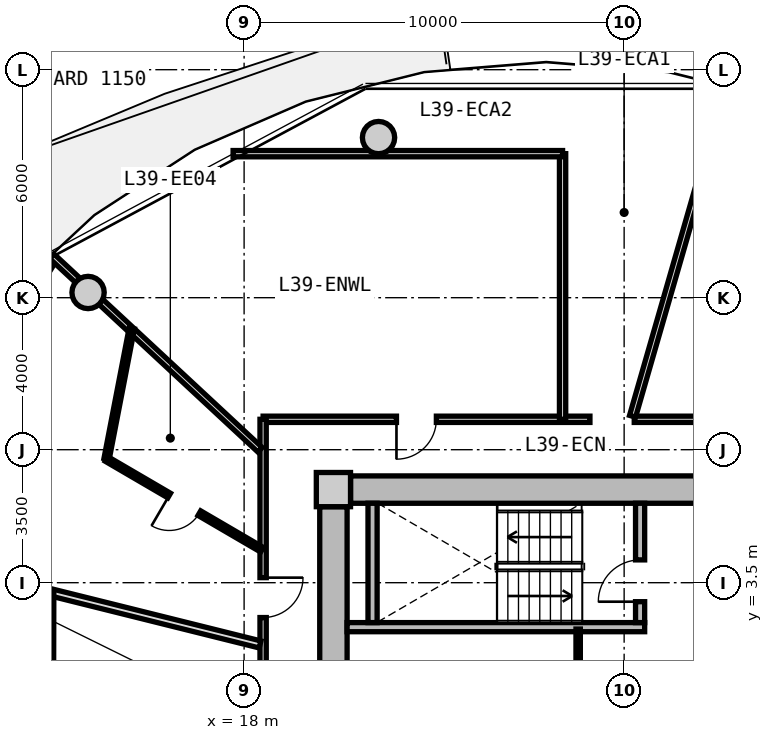
"""IFC4 building model, lengths in metres.
Left out: names, types, materials, properties, quantities, classifications, styles, units other than length and angle.
Written with IfcOpenShell. Run it as: python <this file> out.ifc"""

import sys

from ifc_helpers import new_model, si_unit, direction, frame, frame_2d, origin, origin_2d, place, context, subcontext, project, spatial, rectangle, circle, extrude, source, transform, mapped, element, fill, save


model = new_model("IFC4")
c1 = context("Model", 3, precision=1e-05, world=origin(), true_north=direction((0.0, 1.0)))
c2 = subcontext(c1, "Body", "Model", "MODEL_VIEW")
j1 = project(units=[si_unit("LENGTHUNIT", "METRE"), si_unit("PLANEANGLEUNIT", "RADIAN")], contexts=[c1])
p1 = place(None, origin())
s1 = spatial("IfcSite", under=j1, at=p1, CompositionType="ELEMENT")
p2 = place(p1, origin())
s2 = spatial("IfcBuilding", under=s1, at=p2, CompositionType="ELEMENT")
p3 = place(p2, frame((0.0, 0.0, 126.75)))
s3 = spatial("IfcBuildingStorey", under=s2, at=p3, CompositionType="ELEMENT", Elevation=126.75)
m1 = source(origin(), c2, "Body", "SweptSolid", [
    extrude(rectangle(XDim=0.9, YDim=0.9, at=origin_2d()), origin(), (0.0, 0.0, 1.0), 3.05),
])
p4 = place(p3, frame((20.35, 5.95, 0.0), z_axis=(0.0, 0.0, 1.0), x_axis=(1.0, 0.0, 0.0)))
e1 = element("IfcColumn", 1, at=p4, inside=s3, PredefinedType="COLUMN", context=c2, shape_type="MappedRepresentation", body=[
    mapped(m1, transform((0.0, 0.0, 0.0), x_axis=(1.0, 0.0, 0.0), y_axis=(0.0, 1.0, 0.0), z_axis=(0.0, 0.0, 1.0), scale=1.0)),
])
m2 = source(origin(), c2, "Body", "SweptSolid", [
    extrude(rectangle(XDim=14.4, YDim=0.72, at=frame_2d((7.2, 0.0))), origin(), (0.0, 0.0, 1.0), 2.73),
])
p5 = place(p3, frame((20.8, 5.95, 0.0), z_axis=(0.0, 0.0, 1.0), x_axis=(1.0, 0.0, 0.0)))
e2 = element("IfcWall", 2, at=p5, inside=s3, PredefinedType="SHEAR", context=c2, shape_type="MappedRepresentation", body=[
    mapped(m2, transform((0.0, 0.0, 0.0), x_axis=(1.0, 0.0, 0.0), y_axis=(0.0, 1.0, 0.0), z_axis=(0.0, 0.0, 1.0), scale=1.0)),
])
m3 = source(origin(), c2, "Body", "SweptSolid", [
    extrude(rectangle(XDim=11.0, YDim=0.72, at=frame_2d((5.5, 0.0))), origin(), (0.0, 0.0, 1.0), 2.73),
])
p6 = place(p3, frame((20.35, -5.5, 0.0), z_axis=(0.0, 0.0, 1.0), x_axis=(0.0, 1.0, 0.0)))
e3 = element("IfcWall", 3, at=p6, inside=s3, PredefinedType="SHEAR", context=c2, shape_type="MappedRepresentation", body=[
    mapped(m3, transform((0.0, 0.0, 0.0), x_axis=(1.0, 0.0, 0.0), y_axis=(0.0, 1.0, 0.0), z_axis=(0.0, 0.0, 1.0), scale=1.0)),
])
p7 = place(p6, frame((3.8, 0.0, 0.0)))
e4 = element("IfcOpeningElement", 4, at=p7, cuts=e3, PredefinedType="OPENING", context=c2, shape_type="SweptSolid", body=[
    extrude(rectangle(XDim=1.2, YDim=2.15, at=frame_2d((0.6, 1.075))), frame((0.0, 0.37, 0.0), z_axis=(0.0, -1.0, 0.0), x_axis=(1.0, 0.0, 0.0)), (0.0, 0.0, 1.0), 0.74),
])
m4 = source(origin(), c2, "Body", "SweptSolid", [
    extrude(circle(Radius=0.425, at=origin_2d()), origin(), (0.0, 0.0, 1.0), 3.05),
])
for number, where, z_axis, x_axis in (
    (5, (21.537, 15.213, 0.0), (0.0, 0.0, 1.0), (1.0, 0.0, 0.0)),
    (6, (13.894, 11.137, 0.0), (0.0, 0.0, 1.0), (1.0, 0.0, 0.0)),
):
    element("IfcColumn", number, at=place(p3, frame(where, z_axis=z_axis, x_axis=x_axis)), inside=s3, PredefinedType="COLUMN", context=c2, shape_type="MappedRepresentation", body=[
        mapped(m4, transform((0.0, 0.0, 0.0), x_axis=(1.0, 0.0, 0.0), y_axis=(0.0, 1.0, 0.0), z_axis=(0.0, 0.0, 1.0), scale=1.0)),
    ])
m5 = source(origin(), c2, "Body", "SweptSolid", [
    extrude(rectangle(XDim=9.014, YDim=0.29, at=frame_2d((4.507, 0.0))), origin(), (0.0, 0.0, 1.0), 2.73),
])
p8 = place(p3, frame((8.196, 4.421, 0.0), z_axis=(0.0, 0.0, 1.0), x_axis=(0.527732945084, 0.849410347637, 0.0)))
e7 = element("IfcWall", 7, at=p8, inside=s3, PredefinedType="SOLIDWALL", context=c2, shape_type="MappedRepresentation", body=[
    mapped(m5, transform((0.0, 0.0, 0.0), x_axis=(1.0, 0.0, 0.0), y_axis=(0.0, 1.0, 0.0), z_axis=(0.0, 0.0, 1.0), scale=1.0)),
])
p9 = place(p8, frame((6.98, 0.0, 0.0)))
e8 = element("IfcOpeningElement", 8, at=p9, cuts=e7, PredefinedType="OPENING", context=c2, shape_type="SweptSolid", body=[
    extrude(rectangle(XDim=1.15, YDim=2.25, at=frame_2d((0.575, 1.125))), frame((0.0, 0.155, 0.0), z_axis=(0.0, -1.0, 0.0), x_axis=(1.0, 0.0, 0.0)), (0.0, 0.0, 1.0), 0.31),
])
p10 = place(p8, frame((0.85, 0.0, 0.85)))
e9 = element("IfcOpeningElement", 9, at=p10, cuts=e7, PredefinedType="OPENING", context=c2, shape_type="SweptSolid", body=[
    extrude(rectangle(XDim=1.2, YDim=1.5, at=frame_2d((0.6, 0.75))), frame((0.0, 0.155, 0.0), z_axis=(0.0, -1.0, 0.0), x_axis=(1.0, 0.0, 0.0)), (0.0, 0.0, 1.0), 0.31),
])
m6 = source(origin(), c2, "Body", "SweptSolid", [
    extrude(rectangle(XDim=7.83, YDim=0.24, at=frame_2d((3.915, 0.0))), origin(), (0.0, 0.0, 1.0), 2.73),
])
p11 = place(p3, frame((20.71, 2.33, 0.0), z_axis=(0.0, 0.0, 1.0), x_axis=(1.0, 0.0, 0.0)))
e10 = element("IfcWall", 10, at=p11, inside=s3, PredefinedType="PARTITIONING", context=c2, shape_type="MappedRepresentation", body=[
    mapped(m6, transform((0.0, 0.0, 0.0), x_axis=(1.0, 0.0, 0.0), y_axis=(0.0, 1.0, 0.0), z_axis=(0.0, 0.0, 1.0), scale=1.0)),
])
m7 = source(origin(), c2, "Body", "SweptSolid", [
    extrude(rectangle(XDim=3.14, YDim=0.24, at=frame_2d((1.57, 0.0))), origin(), (0.0, 0.0, 1.0), 2.73),
])
p12 = place(p3, frame((21.38, 2.45, 0.0), z_axis=(0.0, 0.0, 1.0), x_axis=(0.0, 1.0, 0.0)))
e11 = element("IfcWall", 11, at=p12, inside=s3, PredefinedType="PARTITIONING", context=c2, shape_type="MappedRepresentation", body=[
    mapped(m7, transform((0.0, 0.0, 0.0), x_axis=(1.0, 0.0, 0.0), y_axis=(0.0, 1.0, 0.0), z_axis=(0.0, 0.0, 1.0), scale=1.0)),
])
p13 = place(p3, frame((28.42, 2.45, 0.0), z_axis=(0.0, 0.0, 1.0), x_axis=(0.0, 1.0, 0.0)))
e12 = element("IfcWall", 12, at=p13, inside=s3, PredefinedType="PARTITIONING", context=c2, shape_type="MappedRepresentation", body=[
    mapped(m7, transform((0.0, 0.0, 0.0), x_axis=(1.0, 0.0, 0.0), y_axis=(0.0, 1.0, 0.0), z_axis=(0.0, 0.0, 1.0), scale=1.0)),
])
p14 = place(p13, frame((0.55, 0.0, 0.0)))
e13 = element("IfcOpeningElement", 13, at=p14, cuts=e12, PredefinedType="OPENING", context=c2, shape_type="SweptSolid", body=[
    extrude(rectangle(XDim=1.1, YDim=2.15, at=frame_2d((0.55, 1.075))), frame((0.0, 0.13, 0.0), z_axis=(0.0, -1.0, 0.0), x_axis=(1.0, 0.0, 0.0)), (0.0, 0.0, 1.0), 0.26),
])
m8 = source(origin(), c2, "Body", "SweptSolid", [
    extrude(rectangle(XDim=2.33, YDim=0.115, at=frame_2d((1.165, 0.0))), origin(), (0.0, 0.0, 1.0), 2.715),
])
p15 = place(p3, frame((26.79, -0.05, 0.0), z_axis=(0.0, 0.0, 1.0), x_axis=(0.0, 1.0, 0.0)))
e14 = element("IfcWall", 14, at=p15, inside=s3, PredefinedType="PARTITIONING", context=c2, shape_type="MappedRepresentation", body=[
    mapped(m8, transform((0.0, 0.0, 0.0), x_axis=(1.0, 0.0, 0.0), y_axis=(0.0, 1.0, 0.0), z_axis=(0.0, 0.0, 1.0), scale=1.0)),
])
m9 = source(origin(), c2, "Body", "SweptSolid", [
    extrude(rectangle(XDim=8.6, YDim=0.165, at=frame_2d((4.3, 0.0))), origin(), (0.0, 0.0, 1.0), 2.715),
])
p16 = place(p3, frame((18.5, 7.8, 0.0), z_axis=(0.0, 0.0, 1.0), x_axis=(1.0, 0.0, 0.0)))
e15 = element("IfcWall", 15, at=p16, inside=s3, PredefinedType="PARTITIONING", context=c2, shape_type="MappedRepresentation", body=[
    mapped(m9, transform((0.0, 0.0, 0.0), x_axis=(1.0, 0.0, 0.0), y_axis=(0.0, 1.0, 0.0), z_axis=(0.0, 0.0, 1.0), scale=1.0)),
])
p17 = place(p16, frame((3.509, 0.0, 0.0)))
e16 = element("IfcOpeningElement", 16, at=p17, cuts=e15, PredefinedType="OPENING", context=c2, shape_type="SweptSolid", body=[
    extrude(rectangle(XDim=1.05, YDim=2.15, at=frame_2d((0.525, 1.075))), frame((0.0, 0.093, 0.0), z_axis=(0.0, -1.0, 0.0), x_axis=(1.0, 0.0, 0.0)), (0.0, 0.0, 1.0), 0.185),
])
m10 = source(origin(), c2, "Body", "SweptSolid", [
    extrude(rectangle(XDim=9.234, YDim=0.165, at=frame_2d((4.617, 0.0))), origin(), (0.0, 0.0, 1.0), 2.715),
])
p18 = place(p3, frame((28.266, 7.8, 0.0), z_axis=(0.0, 0.0, 1.0), x_axis=(1.0, 0.0, 0.0)))
e17 = element("IfcWall", 17, at=p18, inside=s3, PredefinedType="PARTITIONING", context=c2, shape_type="MappedRepresentation", body=[
    mapped(m10, transform((0.0, 0.0, 0.0), x_axis=(1.0, 0.0, 0.0), y_axis=(0.0, 1.0, 0.0), z_axis=(0.0, 0.0, 1.0), scale=1.0)),
])
p19 = place(p18, frame((7.074, 0.0, 0.0)))
e18 = element("IfcOpeningElement", 18, at=p19, cuts=e17, PredefinedType="OPENING", context=c2, shape_type="SweptSolid", body=[
    extrude(rectangle(XDim=0.92, YDim=2.1, at=frame_2d((0.46, 1.05))), frame((0.0, 0.093, 0.0), z_axis=(0.0, -1.0, 0.0), x_axis=(1.0, 0.0, 0.0)), (0.0, 0.0, 1.0), 0.185),
])
p20 = place(p18, frame((2.588, 0.0, 0.0)))
e19 = element("IfcOpeningElement", 19, at=p20, cuts=e17, PredefinedType="OPENING", context=c2, shape_type="SweptSolid", body=[
    extrude(rectangle(XDim=1.25, YDim=2.2, at=frame_2d((0.625, 1.1))), frame((0.0, 0.093, 0.0), z_axis=(0.0, -1.0, 0.0), x_axis=(1.0, 0.0, 0.0)), (0.0, 0.0, 1.0), 0.185),
])
m11 = source(origin(), c2, "Body", "SweptSolid", [
    extrude(rectangle(XDim=15.6, YDim=0.165, at=frame_2d((7.8, 0.0))), origin(), (0.0, 0.0, 1.0), 2.715),
])
p21 = place(p3, frame((18.5, -7.8, 0.0), z_axis=(0.0, 0.0, 1.0), x_axis=(0.0, 1.0, 0.0)))
e20 = element("IfcWall", 20, at=p21, inside=s3, PredefinedType="PARTITIONING", context=c2, shape_type="MappedRepresentation", body=[
    mapped(m11, transform((0.0, 0.0, 0.0), x_axis=(1.0, 0.0, 0.0), y_axis=(0.0, 1.0, 0.0), z_axis=(0.0, 0.0, 1.0), scale=1.0)),
])
p22 = place(p21, frame((10.383, 0.0, 0.0)))
e21 = element("IfcOpeningElement", 21, at=p22, cuts=e20, PredefinedType="OPENING", context=c2, shape_type="SweptSolid", body=[
    extrude(rectangle(XDim=1.05, YDim=2.15, at=frame_2d((0.525, 1.075))), frame((0.0, 0.093, 0.0), z_axis=(0.0, -1.0, 0.0), x_axis=(1.0, 0.0, 0.0)), (0.0, 0.0, 1.0), 0.185),
])
p23 = place(p21, frame((6.419, 0.0, 0.0)))
e22 = element("IfcOpeningElement", 22, at=p23, cuts=e20, PredefinedType="OPENING", context=c2, shape_type="SweptSolid", body=[
    extrude(rectangle(XDim=1.05, YDim=2.15, at=frame_2d((0.525, 1.075))), frame((0.0, 0.093, 0.0), z_axis=(0.0, -1.0, 0.0), x_axis=(1.0, 0.0, 0.0)), (0.0, 0.0, 1.0), 0.185),
])
m12 = source(origin(), c2, "Body", "SweptSolid", [
    extrude(rectangle(XDim=8.989, YDim=0.165, at=frame_2d((4.495, 0.0))), origin(), (0.0, 0.0, 1.0), 2.215),
])
p24 = place(p3, frame((28.222, 7.88, 0.0), z_axis=(0.0, 0.0, 1.0), x_axis=(0.27702323008, 0.960863221274, 0.0)))
e23 = element("IfcWall", 23, at=p24, inside=s3, PredefinedType="PARTITIONING", context=c2, shape_type="MappedRepresentation", body=[
    mapped(m12, transform((0.0, 0.0, 0.0), x_axis=(1.0, 0.0, 0.0), y_axis=(0.0, 1.0, 0.0), z_axis=(0.0, 0.0, 1.0), scale=1.0)),
])
m13 = source(origin(), c2, "Body", "SweptSolid", [
    extrude(rectangle(XDim=7.482, YDim=0.165, at=frame_2d((3.741, 0.0))), origin(), (0.0, 0.0, 1.0), 2.215),
])
p25 = place(p3, frame((18.42, 6.998, 0.0), z_axis=(0.0, 0.0, 1.0), x_axis=(-0.732508698043, 0.680757671489, 0.0)))
e24 = element("IfcWall", 24, at=p25, inside=s3, PredefinedType="PARTITIONING", context=c2, shape_type="MappedRepresentation", body=[
    mapped(m13, transform((0.0, 0.0, 0.0), x_axis=(1.0, 0.0, 0.0), y_axis=(0.0, 1.0, 0.0), z_axis=(0.0, 0.0, 1.0), scale=1.0)),
])
m14 = source(origin(), c2, "Body", "SweptSolid", [
    extrude(rectangle(XDim=6.99, YDim=0.165, at=frame_2d((3.495, 0.0))), origin(), (0.0, 0.0, 1.0), 2.715),
])
p26 = place(p3, frame((26.38, 7.8, 0.0), z_axis=(0.0, 0.0, 1.0), x_axis=(0.0, 1.0, 0.0)))
e25 = element("IfcWall", 25, at=p26, inside=s3, PredefinedType="PARTITIONING", context=c2, shape_type="MappedRepresentation", body=[
    mapped(m14, transform((0.0, 0.0, 0.0), x_axis=(1.0, 0.0, 0.0), y_axis=(0.0, 1.0, 0.0), z_axis=(0.0, 0.0, 1.0), scale=1.0)),
])
m15 = source(origin(), c2, "Body", "SweptSolid", [
    extrude(rectangle(XDim=8.669, YDim=0.165, at=frame_2d((4.335, 0.0))), origin(), (0.0, 0.0, 1.0), 2.715),
])
p27 = place(p3, frame((17.71, 14.79, 0.0), z_axis=(0.0, 0.0, 1.0), x_axis=(1.0, 0.0, 0.0)))
e26 = element("IfcWall", 26, at=p27, inside=s3, PredefinedType="PARTITIONING", context=c2, shape_type="MappedRepresentation", body=[
    mapped(m15, transform((0.0, 0.0, 0.0), x_axis=(1.0, 0.0, 0.0), y_axis=(0.0, 1.0, 0.0), z_axis=(0.0, 0.0, 1.0), scale=1.0)),
])
m16 = source(origin(), c2, "Body", "SweptSolid", [
    extrude(rectangle(XDim=10.556, YDim=0.19, at=frame_2d((5.278, 0.0))), origin(), (0.0, 0.0, 1.0), 2.215),
])
p28 = place(p3, frame((18.42, 1.875, 0.0), z_axis=(0.0, 0.0, 1.0), x_axis=(-0.970363857851, 0.241648470667, 0.0)))
e27 = element("IfcWall", 27, at=p28, inside=s3, PredefinedType="PARTITIONING", context=c2, shape_type="MappedRepresentation", body=[
    mapped(m16, transform((0.0, 0.0, 0.0), x_axis=(1.0, 0.0, 0.0), y_axis=(0.0, 1.0, 0.0), z_axis=(0.0, 0.0, 1.0), scale=1.0)),
])
m17 = source(origin(), c2, "Body", "SweptSolid", [
    extrude(rectangle(XDim=4.735, YDim=0.14, at=frame_2d((2.368, 0.0))), origin(), (0.0, 0.0, 1.0), 2.715),
])
p29 = place(p3, frame((18.47, 4.368, 0.0), z_axis=(0.0, 0.0, 1.0), x_axis=(-0.863537576642, 0.504284496814, 0.0)))
e28 = element("IfcWall", 28, at=p29, inside=s3, PredefinedType="PARTITIONING", context=c2, shape_type="MappedRepresentation", body=[
    mapped(m17, transform((0.0, 0.0, 0.0), x_axis=(1.0, 0.0, 0.0), y_axis=(0.0, 1.0, 0.0), z_axis=(0.0, 0.0, 1.0), scale=1.0)),
])
p30 = place(p29, frame((1.908, 0.0, 0.0)))
e29 = element("IfcOpeningElement", 29, at=p30, cuts=e28, PredefinedType="OPENING", context=c2, shape_type="SweptSolid", body=[
    extrude(rectangle(XDim=0.92, YDim=2.1, at=frame_2d((0.46, 1.05))), frame((0.0, 0.08, 0.0), z_axis=(0.0, -1.0, 0.0), x_axis=(1.0, 0.0, 0.0)), (0.0, 0.0, 1.0), 0.16),
])
m18 = source(origin(), c2, "Body", "SweptSolid", [
    extrude(rectangle(XDim=3.499, YDim=0.14, at=frame_2d((1.75, 0.0))), origin(), (0.0, 0.0, 1.0), 2.715),
])
p31 = place(p3, frame((14.381, 6.756, 0.0), z_axis=(0.0, 0.0, 1.0), x_axis=(0.18957713629, 0.981865830649, 0.0)))
e30 = element("IfcWall", 30, at=p31, inside=s3, PredefinedType="PARTITIONING", context=c2, shape_type="MappedRepresentation", body=[
    mapped(m18, transform((0.0, 0.0, 0.0), x_axis=(1.0, 0.0, 0.0), y_axis=(0.0, 1.0, 0.0), z_axis=(0.0, 0.0, 1.0), scale=1.0)),
])
m19 = source(origin(), c2, "Body", "SweptSolid", [
    extrude(rectangle(XDim=2.837, YDim=0.14, at=frame_2d((1.418, 0.0))), origin(), (0.0, 0.0, 1.0), 2.715),
])
p32 = place(p3, frame((12.916, 0.425, 0.0), z_axis=(0.0, 0.0, 1.0), x_axis=(0.002409838945, 0.999997096334, 0.0)))
e31 = element("IfcWall", 31, at=p32, inside=s3, PredefinedType="PARTITIONING", context=c2, shape_type="MappedRepresentation", body=[
    mapped(m19, transform((0.0, 0.0, 0.0), x_axis=(1.0, 0.0, 0.0), y_axis=(0.0, 1.0, 0.0), z_axis=(0.0, 0.0, 1.0), scale=1.0)),
])
m20 = source(origin(), c2, "Body", "SweptSolid", [
    extrude(rectangle(XDim=1.1, YDim=2.15, at=frame_2d((0.55, 1.075))), frame((0.0, 0.025, 0.0), z_axis=(0.0, -1.0, 0.0), x_axis=(1.0, 0.0, 0.0)), (0.0, 0.0, 1.0), 0.05),
])
p33 = place(p14, origin())
e32 = element("IfcDoor", 32, at=p33, inside=s3, OperationType="SINGLE_SWING_LEFT", PredefinedType="DOOR", context=c2, shape_type="MappedRepresentation", body=[
    mapped(m20, transform((0.0, 0.0, 0.0), x_axis=(1.0, 0.0, 0.0), y_axis=(0.0, 1.0, 0.0), z_axis=(0.0, 0.0, 1.0), scale=1.0)),
])
fill(e13, e32)
m21 = source(origin(), c2, "Body", "SweptSolid", [
    extrude(rectangle(XDim=1.05, YDim=2.15, at=frame_2d((0.525, 1.075))), frame((0.0, 0.025, 0.0), z_axis=(0.0, -1.0, 0.0), x_axis=(1.0, 0.0, 0.0)), (0.0, 0.0, 1.0), 0.05),
])
p34 = place(p17, frame((1.05, 0.0, 0.0), z_axis=(0.0, 0.0, 1.0), x_axis=(-1.0, 0.0, 0.0)))
e33 = element("IfcDoor", 33, at=p34, inside=s3, OperationType="SINGLE_SWING_RIGHT", PredefinedType="DOOR", context=c2, shape_type="MappedRepresentation", body=[
    mapped(m21, transform((0.0, 0.0, 0.0), x_axis=(1.0, 0.0, 0.0), y_axis=(0.0, 1.0, 0.0), z_axis=(0.0, 0.0, 1.0), scale=1.0)),
])
fill(e16, e33)
p35 = place(p22, frame((1.05, 0.0, 0.0), z_axis=(0.0, 0.0, 1.0), x_axis=(-1.0, 0.0, 0.0)))
e34 = element("IfcDoor", 34, at=p35, inside=s3, OperationType="SINGLE_SWING_LEFT", PredefinedType="DOOR", context=c2, shape_type="MappedRepresentation", body=[
    mapped(m21, transform((0.0, 0.0, 0.0), x_axis=(1.0, 0.0, 0.0), y_axis=(0.0, 1.0, 0.0), z_axis=(0.0, 0.0, 1.0), scale=1.0)),
])
fill(e21, e34)
m22 = source(origin(), c2, "Body", "SweptSolid", [
    extrude(rectangle(XDim=0.92, YDim=2.1, at=frame_2d((0.46, 1.05))), frame((0.0, 0.025, 0.0), z_axis=(0.0, -1.0, 0.0), x_axis=(1.0, 0.0, 0.0)), (0.0, 0.0, 1.0), 0.05),
])
p36 = place(p30, origin())
e35 = element("IfcDoor", 35, at=p36, inside=s3, OperationType="SINGLE_SWING_RIGHT", PredefinedType="DOOR", context=c2, shape_type="MappedRepresentation", body=[
    mapped(m22, transform((0.0, 0.0, 0.0), x_axis=(1.0, 0.0, 0.0), y_axis=(0.0, 1.0, 0.0), z_axis=(0.0, 0.0, 1.0), scale=1.0)),
])
fill(e29, e35)
save(model, sys.argv[1])
